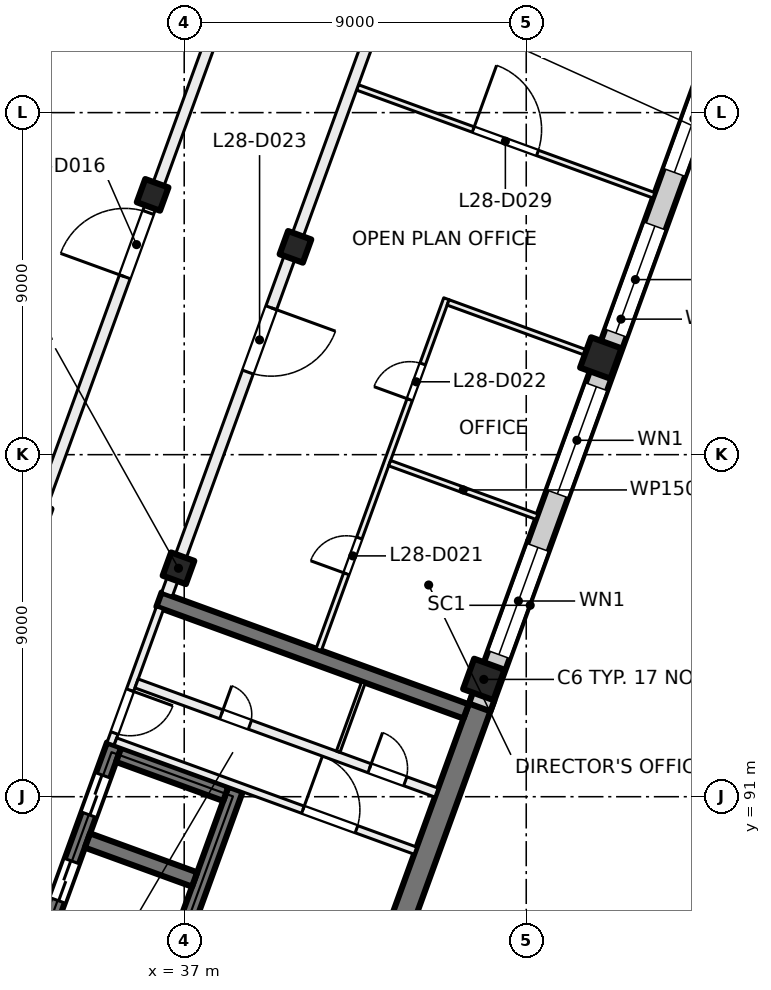
"""IFC4 building model, lengths in metres.
Left out: names, types, materials, properties, quantities, classifications, styles, units other than length and angle.
Written with IfcOpenShell. Run it as: python <this file> out.ifc"""

import sys

from ifc_helpers import new_model, si_unit, direction, frame, frame_2d, origin, origin_2d, place, context, subcontext, project, spatial, rectangle, extrude, element, fill, save


model = new_model("IFC4")
c1 = context("Model", 3, precision=1e-05, world=origin(), true_north=direction((0.0, 1.0)))
c2 = subcontext(c1, "Body", "Model", "MODEL_VIEW")
j1 = project(units=[si_unit("LENGTHUNIT", "METRE"), si_unit("PLANEANGLEUNIT", "RADIAN")], contexts=[c1])
p1 = place(None, origin())
s1 = spatial("IfcSite", under=j1, at=p1, CompositionType="ELEMENT")
p2 = place(p1, origin())
s2 = spatial("IfcBuilding", under=s1, at=p2, CompositionType="ELEMENT")
p3 = place(p2, frame((0.0, 0.0, 121.0)))
s3 = spatial("IfcBuildingStorey", under=s2, at=p3, CompositionType="ELEMENT", Elevation=121.0)
for number, where, z_axis, x_axis in (
    (1, (39.927, 105.468, 0.0), (0.0, 0.0, 1.0), (-0.342, -0.94, 0.0)),
    (2, (36.849, 97.011, 0.0), (0.0, 0.0, 1.0), (-0.342, -0.94, 0.0)),
    (3, (36.169, 106.836, 0.0), (0.0, 0.0, 1.0), (-0.342, -0.94, 0.0)),
):
    element("IfcColumn", number, at=place(p3, frame(where, z_axis=z_axis, x_axis=x_axis)), inside=s3, PredefinedType="COLUMN", context=c2, shape_type="SweptSolid", body=[
        extrude(rectangle(XDim=0.65, YDim=0.65, at=origin_2d()), origin(), (0.0, 0.0, 1.0), 4.0),
    ])
for number, where, z_axis, x_axis in (
    (4, (47.962, 102.544, 0.0), (0.0, 0.0, 1.0), (-0.342, -0.94, 0.0)),
    (5, (44.884, 94.087, 0.0), (0.0, 0.0, 1.0), (-0.342, -0.94, 0.0)),
):
    element("IfcColumn", number, at=place(p3, frame(where, z_axis=z_axis, x_axis=x_axis)), inside=s3, PredefinedType="COLUMN", context=c2, shape_type="SweptSolid", body=[
        extrude(rectangle(XDim=0.85, YDim=0.85, at=origin_2d()), origin(), (0.0, 0.0, 1.0), 4.0),
    ])
p4 = place(p3, frame((41.827, 85.249, 0.0), z_axis=(0.0, 0.0, 1.0), x_axis=(0.342017595281, 0.939693548195, 0.0)))
e6 = element("IfcWall", 6, at=p4, inside=s3, PredefinedType="SHEAR", context=c2, shape_type="SweptSolid", body=[
    extrude(rectangle(XDim=8.925, YDim=0.6, at=frame_2d((4.462, 0.0))), origin(), (0.0, 0.0, 1.0), 4.0),
])
p5 = place(p3, frame((30.984, 80.895, 0.0), z_axis=(0.0, 0.0, 1.0), x_axis=(0.342021021735, 0.939692301071, 0.0)))
e7 = element("IfcWall", 7, at=p5, inside=s3, PredefinedType="SHEAR", context=c2, shape_type="SweptSolid", body=[
    extrude(rectangle(XDim=12.2, YDim=0.4, at=frame_2d((6.1, 0.0))), origin(), (0.0, 0.0, 1.0), 4.0),
])
p6 = place(p5, frame((5.45, 0.0, 0.0)))
e8 = element("IfcOpeningElement", 8, at=p6, cuts=e7, PredefinedType="OPENING", context=c2, shape_type="SweptSolid", body=[
    extrude(rectangle(XDim=1.1, YDim=2.1, at=frame_2d((0.55, 1.05))), frame((0.0, 0.21, 0.0), z_axis=(0.0, -1.0, 0.0), x_axis=(1.0, 0.0, 0.0)), (0.0, 0.0, 1.0), 0.42),
])
p7 = place(p5, frame((7.85, 0.0, 0.0)))
e9 = element("IfcOpeningElement", 9, at=p7, cuts=e7, PredefinedType="OPENING", context=c2, shape_type="SweptSolid", body=[
    extrude(rectangle(XDim=1.1, YDim=2.1, at=frame_2d((0.55, 1.05))), frame((0.0, 0.21, 0.0), z_axis=(0.0, -1.0, 0.0), x_axis=(1.0, 0.0, 0.0)), (0.0, 0.0, 1.0), 0.42),
])
p8 = place(p5, frame((10.25, 0.0, 0.0)))
e10 = element("IfcOpeningElement", 10, at=p8, cuts=e7, PredefinedType="OPENING", context=c2, shape_type="SweptSolid", body=[
    extrude(rectangle(XDim=1.1, YDim=2.1, at=frame_2d((0.55, 1.05))), frame((0.0, 0.21, 0.0), z_axis=(0.0, -1.0, 0.0), x_axis=(1.0, 0.0, 0.0)), (0.0, 0.0, 1.0), 0.42),
])
p9 = place(p3, frame((34.178, 79.732, 0.0), z_axis=(0.0, 0.0, 1.0), x_axis=(0.342014590177, 0.939694641948, 0.0)))
e11 = element("IfcWall", 11, at=p9, inside=s3, PredefinedType="SHEAR", context=c2, shape_type="SweptSolid", body=[
    extrude(rectangle(XDim=12.2, YDim=0.4, at=frame_2d((6.1, 0.0))), origin(), (0.0, 0.0, 1.0), 4.0),
])
p10 = place(p3, frame((37.274, 88.822, 0.0), z_axis=(0.0, 0.0, 1.0), x_axis=(-0.939686455819, 0.342037080957, 0.0)))
e12 = element("IfcWall", 12, at=p10, inside=s3, PredefinedType="SHEAR", context=c2, shape_type="SweptSolid", body=[
    extrude(rectangle(XDim=3.0, YDim=0.4, at=frame_2d((1.5, 0.0))), origin(), (0.0, 0.0, 1.0), 4.0),
])
p11 = place(p3, frame((38.095, 91.077, 0.0), z_axis=(0.0, 0.0, 1.0), x_axis=(-0.939676934218, 0.342063238742, 0.0)))
e13 = element("IfcWall", 13, at=p11, inside=s3, PredefinedType="SHEAR", context=c2, shape_type="SweptSolid", body=[
    extrude(rectangle(XDim=3.0, YDim=0.4, at=frame_2d((1.5, 0.0))), origin(), (0.0, 0.0, 1.0), 4.0),
])
p12 = place(p3, frame((44.418, 93.245, 0.0), z_axis=(0.0, 0.0, 1.0), x_axis=(-0.93969060187, 0.342025690201, 0.0)))
e14 = element("IfcWall", 14, at=p12, inside=s3, PredefinedType="SHEAR", context=c2, shape_type="SweptSolid", body=[
    extrude(rectangle(XDim=8.6, YDim=0.4, at=frame_2d((4.3, 0.0))), origin(), (0.0, 0.0, 1.0), 4.0),
])
p13 = place(p3, frame((52.212, 113.783, 0.0), z_axis=(0.0, 0.0, 1.0), x_axis=(-0.34202521188, -0.939690775968, 0.0)))
e15 = element("IfcWall", 15, at=p13, inside=s3, PredefinedType="SOLIDWALL", context=c2, shape_type="SweptSolid", body=[
    extrude(rectangle(XDim=21.745, YDim=0.6, at=frame_2d((10.873, 0.0))), origin(), (0.0, 0.0, 1.0), 3.625),
])
p14 = place(p13, frame((3.765, 0.0, 0.9)))
e16 = element("IfcOpeningElement", 16, at=p14, cuts=e15, PredefinedType="OPENING", context=c2, shape_type="SweptSolid", body=[
    extrude(rectangle(XDim=3.0, YDim=2.4, at=frame_2d((1.5, 1.2))), frame((0.0, 0.31, 0.0), z_axis=(0.0, -1.0, 0.0), x_axis=(1.0, 0.0, 0.0)), (0.0, 0.0, 1.0), 0.62),
])
p15 = place(p13, frame((8.265, 0.0, 0.9)))
e17 = element("IfcOpeningElement", 17, at=p15, cuts=e15, PredefinedType="OPENING", context=c2, shape_type="SweptSolid", body=[
    extrude(rectangle(XDim=3.0, YDim=2.4, at=frame_2d((1.5, 1.2))), frame((0.0, 0.31, 0.0), z_axis=(0.0, -1.0, 0.0), x_axis=(1.0, 0.0, 0.0)), (0.0, 0.0, 1.0), 0.62),
])
p16 = place(p13, frame((12.765, 0.0, 0.9)))
e18 = element("IfcOpeningElement", 18, at=p16, cuts=e15, PredefinedType="OPENING", context=c2, shape_type="SweptSolid", body=[
    extrude(rectangle(XDim=3.0, YDim=2.4, at=frame_2d((1.5, 1.2))), frame((0.0, 0.31, 0.0), z_axis=(0.0, -1.0, 0.0), x_axis=(1.0, 0.0, 0.0)), (0.0, 0.0, 1.0), 0.62),
])
p17 = place(p13, frame((17.265, 0.0, 0.9)))
e19 = element("IfcOpeningElement", 19, at=p17, cuts=e15, PredefinedType="OPENING", context=c2, shape_type="SweptSolid", body=[
    extrude(rectangle(XDim=3.0, YDim=2.4, at=frame_2d((1.5, 1.2))), frame((0.0, 0.31, 0.0), z_axis=(0.0, -1.0, 0.0), x_axis=(1.0, 0.0, 0.0)), (0.0, 0.0, 1.0), 0.62),
])
p18 = place(p3, frame((24.666, 100.669, 0.0), z_axis=(0.0, 0.0, 1.0), x_axis=(0.34201964167, 0.939692803373, 0.0)))
e20 = element("IfcWall", 20, at=p18, inside=s3, PredefinedType="SOLIDWALL", context=c2, shape_type="SweptSolid", body=[
    extrude(rectangle(XDim=32.884, YDim=0.6, at=frame_2d((16.442, 0.0))), origin(), (0.0, 0.0, 1.0), 3.625),
])
p19 = place(p18, frame((1.48, 0.0, 0.9)))
e21 = element("IfcOpeningElement", 21, at=p19, cuts=e20, PredefinedType="OPENING", context=c2, shape_type="SweptSolid", body=[
    extrude(rectangle(XDim=3.0, YDim=2.4, at=frame_2d((1.5, 1.2))), frame((0.0, 0.31, 0.0), z_axis=(0.0, -1.0, 0.0), x_axis=(1.0, 0.0, 0.0)), (0.0, 0.0, 1.0), 0.62),
])
p20 = place(p18, frame((5.98, 0.0, 0.9)))
e22 = element("IfcOpeningElement", 22, at=p20, cuts=e20, PredefinedType="OPENING", context=c2, shape_type="SweptSolid", body=[
    extrude(rectangle(XDim=3.0, YDim=2.4, at=frame_2d((1.5, 1.2))), frame((0.0, 0.31, 0.0), z_axis=(0.0, -1.0, 0.0), x_axis=(1.0, 0.0, 0.0)), (0.0, 0.0, 1.0), 0.62),
])
p21 = place(p18, frame((10.48, 0.0, 0.9)))
e23 = element("IfcOpeningElement", 23, at=p21, cuts=e20, PredefinedType="OPENING", context=c2, shape_type="SweptSolid", body=[
    extrude(rectangle(XDim=3.0, YDim=2.4, at=frame_2d((1.5, 1.2))), frame((0.0, 0.31, 0.0), z_axis=(0.0, -1.0, 0.0), x_axis=(1.0, 0.0, 0.0)), (0.0, 0.0, 1.0), 0.62),
])
p22 = place(p18, frame((14.98, 0.0, 0.9)))
e24 = element("IfcOpeningElement", 24, at=p22, cuts=e20, PredefinedType="OPENING", context=c2, shape_type="SweptSolid", body=[
    extrude(rectangle(XDim=3.0, YDim=2.4, at=frame_2d((1.5, 1.2))), frame((0.0, 0.31, 0.0), z_axis=(0.0, -1.0, 0.0), x_axis=(1.0, 0.0, 0.0)), (0.0, 0.0, 1.0), 0.62),
])
p23 = place(p18, frame((19.48, 0.0, 0.9)))
e25 = element("IfcOpeningElement", 25, at=p23, cuts=e20, PredefinedType="OPENING", context=c2, shape_type="SweptSolid", body=[
    extrude(rectangle(XDim=3.0, YDim=2.4, at=frame_2d((1.5, 1.2))), frame((0.0, 0.31, 0.0), z_axis=(0.0, -1.0, 0.0), x_axis=(1.0, 0.0, 0.0)), (0.0, 0.0, 1.0), 0.62),
])
p24 = place(p18, frame((23.98, 0.0, 0.9)))
e26 = element("IfcOpeningElement", 26, at=p24, cuts=e20, PredefinedType="OPENING", context=c2, shape_type="SweptSolid", body=[
    extrude(rectangle(XDim=3.0, YDim=2.4, at=frame_2d((1.5, 1.2))), frame((0.0, 0.31, 0.0), z_axis=(0.0, -1.0, 0.0), x_axis=(1.0, 0.0, 0.0)), (0.0, 0.0, 1.0), 0.62),
])
p25 = place(p18, frame((28.48, 0.0, 0.9)))
e27 = element("IfcOpeningElement", 27, at=p25, cuts=e20, PredefinedType="OPENING", context=c2, shape_type="SweptSolid", body=[
    extrude(rectangle(XDim=3.0, YDim=2.4, at=frame_2d((1.5, 1.2))), frame((0.0, 0.31, 0.0), z_axis=(0.0, -1.0, 0.0), x_axis=(1.0, 0.0, 0.0)), (0.0, 0.0, 1.0), 0.62),
])
p26 = place(p3, frame((36.362, 95.964, 0.0), z_axis=(0.0, 0.0, 1.0), x_axis=(-0.341995824804, -0.939701471648, 0.0)))
e28 = element("IfcWall", 28, at=p26, inside=s3, PredefinedType="PARTITIONING", context=c2, shape_type="SweptSolid", body=[
    extrude(rectangle(XDim=3.8, YDim=0.2, at=frame_2d((1.9, 0.0))), origin(), (0.0, 0.0, 1.0), 3.625),
])
p27 = place(p26, frame((2.3, 0.0, 0.0)))
e29 = element("IfcOpeningElement", 29, at=p27, cuts=e28, PredefinedType="OPENING", context=c2, shape_type="SweptSolid", body=[
    extrude(rectangle(XDim=1.2, YDim=2.1, at=frame_2d((0.6, 1.05))), frame((0.0, 0.11, 0.0), z_axis=(0.0, -1.0, 0.0), x_axis=(1.0, 0.0, 0.0)), (0.0, 0.0, 1.0), 0.22),
])
p28 = place(p3, frame((35.19, 92.453, 0.0), z_axis=(0.0, 0.0, 1.0), x_axis=(0.939691552312, -0.342023078919, 0.0)))
e30 = element("IfcWall", 30, at=p28, inside=s3, PredefinedType="PARTITIONING", context=c2, shape_type="SweptSolid", body=[
    extrude(rectangle(XDim=8.4, YDim=0.2, at=frame_2d((4.2, 0.0))), origin(), (0.0, 0.0, 1.0), 3.625),
])
p29 = place(p28, frame((5.25, 0.0, 0.0)))
e31 = element("IfcOpeningElement", 31, at=p29, cuts=e30, PredefinedType="OPENING", context=c2, shape_type="SweptSolid", body=[
    extrude(rectangle(XDim=1.5, YDim=2.1, at=frame_2d((0.75, 1.05))), frame((0.0, 0.11, 0.0), z_axis=(0.0, -1.0, 0.0), x_axis=(1.0, 0.0, 0.0)), (0.0, 0.0, 1.0), 0.22),
])
p30 = place(p3, frame((35.746, 93.98, 0.0), z_axis=(0.0, 0.0, 1.0), x_axis=(0.939691552312, -0.342023078919, 0.0)))
e32 = element("IfcWall", 32, at=p30, inside=s3, PredefinedType="PARTITIONING", context=c2, shape_type="SweptSolid", body=[
    extrude(rectangle(XDim=8.4, YDim=0.25, at=frame_2d((4.2, 0.0))), origin(), (0.0, 0.0, 1.0), 3.625),
])
p31 = place(p30, frame((2.375, 0.0, 0.0)))
e33 = element("IfcOpeningElement", 33, at=p31, cuts=e32, PredefinedType="OPENING", context=c2, shape_type="SweptSolid", body=[
    extrude(rectangle(XDim=0.8, YDim=2.1, at=frame_2d((0.4, 1.05))), frame((0.0, 0.135, 0.0), z_axis=(0.0, -1.0, 0.0), x_axis=(1.0, 0.0, 0.0)), (0.0, 0.0, 1.0), 0.27),
])
p32 = place(p30, frame((6.525, 0.0, 0.0)))
e34 = element("IfcOpeningElement", 34, at=p32, cuts=e32, PredefinedType="OPENING", context=c2, shape_type="SweptSolid", body=[
    extrude(rectangle(XDim=1.0, YDim=2.1, at=frame_2d((0.5, 1.05))), frame((0.0, 0.135, 0.0), z_axis=(0.0, -1.0, 0.0), x_axis=(1.0, 0.0, 0.0)), (0.0, 0.0, 1.0), 0.27),
])
p33 = place(p3, frame((41.718, 94.015, 0.0), z_axis=(0.0, 0.0, 1.0), x_axis=(-0.342064742067, -0.939676386973, 0.0)))
e35 = element("IfcWall", 35, at=p33, inside=s3, PredefinedType="PARTITIONING", context=c2, shape_type="SweptSolid", body=[
    extrude(rectangle(XDim=1.95, YDim=0.1, at=frame_2d((0.975, 0.0))), origin(), (0.0, 0.0, 1.0), 3.625),
])
p34 = place(p3, frame((32.881, 97.657, 0.0), z_axis=(0.0, 0.0, 1.0), x_axis=(0.342017360004, 0.939693633828, 0.0)))
e36 = element("IfcWall", 36, at=p34, inside=s3, PredefinedType="PARTITIONING", context=c2, shape_type="SweptSolid", body=[
    extrude(rectangle(XDim=34.516, YDim=0.3, at=frame_2d((17.258, 0.0))), origin(), (0.0, 0.0, 1.0), 3.625),
])
p35 = place(p34, frame((7.475, 0.0, 0.0)))
e37 = element("IfcOpeningElement", 37, at=p35, cuts=e36, PredefinedType="OPENING", context=c2, shape_type="SweptSolid", body=[
    extrude(rectangle(XDim=1.8, YDim=2.1, at=frame_2d((0.9, 1.05))), frame((0.0, 0.16, 0.0), z_axis=(0.0, -1.0, 0.0), x_axis=(1.0, 0.0, 0.0)), (0.0, 0.0, 1.0), 0.32),
])
p36 = place(p34, frame((24.0, 0.0, 0.0)))
e38 = element("IfcOpeningElement", 38, at=p36, cuts=e36, PredefinedType="OPENING", context=c2, shape_type="SweptSolid", body=[
    extrude(rectangle(XDim=1.0, YDim=2.1, at=frame_2d((0.5, 1.05))), frame((0.0, 0.16, 0.0), z_axis=(0.0, -1.0, 0.0), x_axis=(1.0, 0.0, 0.0)), (0.0, 0.0, 1.0), 0.32),
])
p37 = place(p3, frame((40.539, 94.87, 0.0), z_axis=(0.0, 0.0, 1.0), x_axis=(0.342082231415, 0.939670020247, 0.0)))
e39 = element("IfcWall", 39, at=p37, inside=s3, PredefinedType="PARTITIONING", context=c2, shape_type="SweptSolid", body=[
    extrude(rectangle(XDim=9.825, YDim=0.15, at=frame_2d((4.912, 0.0))), origin(), (0.0, 0.0, 1.0), 3.625),
])
p38 = place(p37, frame((2.125, 0.0, 0.0)))
e40 = element("IfcOpeningElement", 40, at=p38, cuts=e39, PredefinedType="OPENING", context=c2, shape_type="SweptSolid", body=[
    extrude(rectangle(XDim=1.0, YDim=2.1, at=frame_2d((0.5, 1.05))), frame((0.0, 0.085, 0.0), z_axis=(0.0, -1.0, 0.0), x_axis=(1.0, 0.0, 0.0)), (0.0, 0.0, 1.0), 0.17),
])
p39 = place(p37, frame((7.0, 0.0, 0.0)))
e41 = element("IfcOpeningElement", 41, at=p39, cuts=e39, PredefinedType="OPENING", context=c2, shape_type="SweptSolid", body=[
    extrude(rectangle(XDim=1.0, YDim=2.1, at=frame_2d((0.5, 1.05))), frame((0.0, 0.085, 0.0), z_axis=(0.0, -1.0, 0.0), x_axis=(1.0, 0.0, 0.0)), (0.0, 0.0, 1.0), 0.17),
])
p40 = place(p3, frame((41.561, 109.663, 0.0), z_axis=(0.0, 0.0, 1.0), x_axis=(0.939673986983, -0.342071334939, 0.0)))
e42 = element("IfcWall", 42, at=p40, inside=s3, PredefinedType="PARTITIONING", context=c2, shape_type="SweptSolid", body=[
    extrude(rectangle(XDim=8.3, YDim=0.15, at=frame_2d((4.15, 0.0))), origin(), (0.0, 0.0, 1.0), 3.625),
])
p41 = place(p40, frame((3.24, 0.0, 0.0)))
e43 = element("IfcOpeningElement", 43, at=p41, cuts=e42, PredefinedType="OPENING", context=c2, shape_type="SweptSolid", body=[
    extrude(rectangle(XDim=1.8, YDim=2.1, at=frame_2d((0.9, 1.05))), frame((0.0, 0.085, 0.0), z_axis=(0.0, -1.0, 0.0), x_axis=(1.0, 0.0, 0.0)), (0.0, 0.0, 1.0), 0.17),
])
p42 = place(p3, frame((42.405, 99.777, 0.0), z_axis=(0.0, 0.0, 1.0), x_axis=(0.939765774653, -0.341819087808, 0.0)))
e44 = element("IfcWall", 44, at=p42, inside=s3, PredefinedType="PARTITIONING", context=c2, shape_type="SweptSolid", body=[
    extrude(rectangle(XDim=4.125, YDim=0.15, at=frame_2d((2.063, 0.0))), origin(), (0.0, 0.0, 1.0), 3.625),
])
p43 = place(p3, frame((47.314, 125.909, 0.0), z_axis=(0.0, 0.0, 1.0), x_axis=(-0.342010770371, -0.939696032209, 0.0)))
e45 = element("IfcWall", 45, at=p43, inside=s3, PredefinedType="PARTITIONING", context=c2, shape_type="SweptSolid", body=[
    extrude(rectangle(XDim=31.485, YDim=0.3, at=frame_2d((15.742, 0.0))), origin(), (0.0, 0.0, 1.0), 3.625),
])
p44 = place(p43, frame((23.459, 0.0, 0.0)))
e46 = element("IfcOpeningElement", 46, at=p44, cuts=e45, PredefinedType="OPENING", context=c2, shape_type="SweptSolid", body=[
    extrude(rectangle(XDim=1.8, YDim=2.1, at=frame_2d((0.9, 1.05))), frame((0.0, 0.16, 0.0), z_axis=(0.0, -1.0, 0.0), x_axis=(1.0, 0.0, 0.0)), (0.0, 0.0, 1.0), 0.32),
])
p45 = place(p43, frame((5.484, 0.0, 0.0)))
e47 = element("IfcOpeningElement", 47, at=p45, cuts=e45, PredefinedType="OPENING", context=c2, shape_type="SweptSolid", body=[
    extrude(rectangle(XDim=1.0, YDim=2.1, at=frame_2d((0.5, 1.05))), frame((0.0, 0.16, 0.0), z_axis=(0.0, -1.0, 0.0), x_axis=(1.0, 0.0, 0.0)), (0.0, 0.0, 1.0), 0.32),
])
p46 = place(p3, frame((43.944, 104.006, 0.0), z_axis=(0.0, 0.0, 1.0), x_axis=(0.939689717042, -0.34202812119, 0.0)))
e48 = element("IfcWall", 48, at=p46, inside=s3, PredefinedType="PARTITIONING", context=c2, shape_type="SweptSolid", body=[
    extrude(rectangle(XDim=4.126, YDim=0.15, at=frame_2d((2.063, 0.0))), origin(), (0.0, 0.0, 1.0), 3.625),
])
p47 = place(p14, origin())
e49 = element("IfcWindow", 49, at=p47, inside=s3, PartitioningType="SINGLE_PANEL", PredefinedType="WINDOW", context=c2, shape_type="SweptSolid", body=[
    extrude(rectangle(XDim=3.0, YDim=2.4, at=frame_2d((1.5, 1.2))), frame((0.0, 0.03, 0.0), z_axis=(0.0, -1.0, 0.0), x_axis=(1.0, 0.0, 0.0)), (0.0, 0.0, 1.0), 0.06),
])
fill(e16, e49)
p48 = place(p15, origin())
e50 = element("IfcWindow", 50, at=p48, inside=s3, PartitioningType="SINGLE_PANEL", PredefinedType="WINDOW", context=c2, shape_type="SweptSolid", body=[
    extrude(rectangle(XDim=3.0, YDim=2.4, at=frame_2d((1.5, 1.2))), frame((0.0, 0.03, 0.0), z_axis=(0.0, -1.0, 0.0), x_axis=(1.0, 0.0, 0.0)), (0.0, 0.0, 1.0), 0.06),
])
fill(e17, e50)
p49 = place(p16, origin())
e51 = element("IfcWindow", 51, at=p49, inside=s3, PartitioningType="SINGLE_PANEL", PredefinedType="WINDOW", context=c2, shape_type="SweptSolid", body=[
    extrude(rectangle(XDim=3.0, YDim=2.4, at=frame_2d((1.5, 1.2))), frame((0.0, 0.03, 0.0), z_axis=(0.0, -1.0, 0.0), x_axis=(1.0, 0.0, 0.0)), (0.0, 0.0, 1.0), 0.06),
])
fill(e18, e51)
p50 = place(p17, origin())
e52 = element("IfcWindow", 52, at=p50, inside=s3, PartitioningType="SINGLE_PANEL", PredefinedType="WINDOW", context=c2, shape_type="SweptSolid", body=[
    extrude(rectangle(XDim=3.0, YDim=2.4, at=frame_2d((1.5, 1.2))), frame((0.0, 0.03, 0.0), z_axis=(0.0, -1.0, 0.0), x_axis=(1.0, 0.0, 0.0)), (0.0, 0.0, 1.0), 0.06),
])
fill(e19, e52)
p51 = place(p7, origin())
e53 = element("IfcDoor", 53, at=p51, inside=s3, OperationType="DOUBLE_DOOR_SLIDING", PredefinedType="DOOR", context=c2, shape_type="SweptSolid", body=[
    extrude(rectangle(XDim=1.1, YDim=2.1, at=frame_2d((0.55, 1.05))), frame((0.0, 0.025, 0.0), z_axis=(0.0, -1.0, 0.0), x_axis=(1.0, 0.0, 0.0)), (0.0, 0.0, 1.0), 0.05),
])
fill(e9, e53)
p52 = place(p8, origin())
e54 = element("IfcDoor", 54, at=p52, inside=s3, OperationType="DOUBLE_DOOR_SLIDING", PredefinedType="DOOR", context=c2, shape_type="SweptSolid", body=[
    extrude(rectangle(XDim=1.1, YDim=2.1, at=frame_2d((0.55, 1.05))), frame((0.0, 0.025, 0.0), z_axis=(0.0, -1.0, 0.0), x_axis=(1.0, 0.0, 0.0)), (0.0, 0.0, 1.0), 0.05),
])
fill(e10, e54)
p53 = place(p27, origin())
e55 = element("IfcDoor", 55, at=p53, inside=s3, OperationType="DOUBLE_DOOR_SINGLE_SWING", PredefinedType="DOOR", context=c2, shape_type="SweptSolid", body=[
    extrude(rectangle(XDim=1.2, YDim=2.1, at=frame_2d((0.6, 1.05))), frame((0.0, 0.025, 0.0), z_axis=(0.0, -1.0, 0.0), x_axis=(1.0, 0.0, 0.0)), (0.0, 0.0, 1.0), 0.05),
])
fill(e29, e55)
p54 = place(p29, origin())
e56 = element("IfcDoor", 56, at=p54, inside=s3, OperationType="DOUBLE_DOOR_SINGLE_SWING", PredefinedType="DOOR", context=c2, shape_type="SweptSolid", body=[
    extrude(rectangle(XDim=1.5, YDim=2.1, at=frame_2d((0.75, 1.05))), frame((0.0, 0.025, 0.0), z_axis=(0.0, -1.0, 0.0), x_axis=(1.0, 0.0, 0.0)), (0.0, 0.0, 1.0), 0.05),
])
fill(e31, e56)
p55 = place(p31, origin())
e57 = element("IfcDoor", 57, at=p55, inside=s3, OperationType="SINGLE_SWING_RIGHT", PredefinedType="DOOR", context=c2, shape_type="SweptSolid", body=[
    extrude(rectangle(XDim=0.8, YDim=2.1, at=frame_2d((0.4, 1.05))), frame((0.0, 0.025, 0.0), z_axis=(0.0, -1.0, 0.0), x_axis=(1.0, 0.0, 0.0)), (0.0, 0.0, 1.0), 0.05),
])
fill(e33, e57)
p56 = place(p32, origin())
e58 = element("IfcDoor", 58, at=p56, inside=s3, OperationType="SINGLE_SWING_LEFT", PredefinedType="DOOR", context=c2, shape_type="SweptSolid", body=[
    extrude(rectangle(XDim=1.0, YDim=2.1, at=frame_2d((0.5, 1.05))), frame((0.0, 0.025, 0.0), z_axis=(0.0, -1.0, 0.0), x_axis=(1.0, 0.0, 0.0)), (0.0, 0.0, 1.0), 0.05),
])
fill(e34, e58)
p57 = place(p35, origin())
e59 = element("IfcDoor", 59, at=p57, inside=s3, OperationType="DOUBLE_DOOR_SINGLE_SWING", PredefinedType="DOOR", context=c2, shape_type="SweptSolid", body=[
    extrude(rectangle(XDim=1.8, YDim=2.1, at=frame_2d((0.9, 1.05))), frame((0.0, 0.025, 0.0), z_axis=(0.0, -1.0, 0.0), x_axis=(1.0, 0.0, 0.0)), (0.0, 0.0, 1.0), 0.05),
])
fill(e37, e59)
p58 = place(p38, origin())
e60 = element("IfcDoor", 60, at=p58, inside=s3, OperationType="SINGLE_SWING_LEFT", PredefinedType="DOOR", context=c2, shape_type="SweptSolid", body=[
    extrude(rectangle(XDim=1.0, YDim=2.1, at=frame_2d((0.5, 1.05))), frame((0.0, 0.025, 0.0), z_axis=(0.0, -1.0, 0.0), x_axis=(1.0, 0.0, 0.0)), (0.0, 0.0, 1.0), 0.05),
])
fill(e40, e60)
p59 = place(p39, origin())
e61 = element("IfcDoor", 61, at=p59, inside=s3, OperationType="SINGLE_SWING_LEFT", PredefinedType="DOOR", context=c2, shape_type="SweptSolid", body=[
    extrude(rectangle(XDim=1.0, YDim=2.1, at=frame_2d((0.5, 1.05))), frame((0.0, 0.025, 0.0), z_axis=(0.0, -1.0, 0.0), x_axis=(1.0, 0.0, 0.0)), (0.0, 0.0, 1.0), 0.05),
])
fill(e41, e61)
p60 = place(p44, origin())
e62 = element("IfcDoor", 62, at=p60, inside=s3, OperationType="DOUBLE_DOOR_SINGLE_SWING", PredefinedType="DOOR", context=c2, shape_type="SweptSolid", body=[
    extrude(rectangle(XDim=1.8, YDim=2.1, at=frame_2d((0.9, 1.05))), frame((0.0, 0.025, 0.0), z_axis=(0.0, -1.0, 0.0), x_axis=(1.0, 0.0, 0.0)), (0.0, 0.0, 1.0), 0.05),
])
fill(e46, e62)
p61 = place(p41, origin())
e63 = element("IfcDoor", 63, at=p61, inside=s3, OperationType="DOUBLE_DOOR_SINGLE_SWING", PredefinedType="DOOR", context=c2, shape_type="SweptSolid", body=[
    extrude(rectangle(XDim=1.8, YDim=2.1, at=frame_2d((0.9, 1.05))), frame((0.0, 0.025, 0.0), z_axis=(0.0, -1.0, 0.0), x_axis=(1.0, 0.0, 0.0)), (0.0, 0.0, 1.0), 0.05),
])
fill(e43, e63)
save(model, sys.argv[1])
